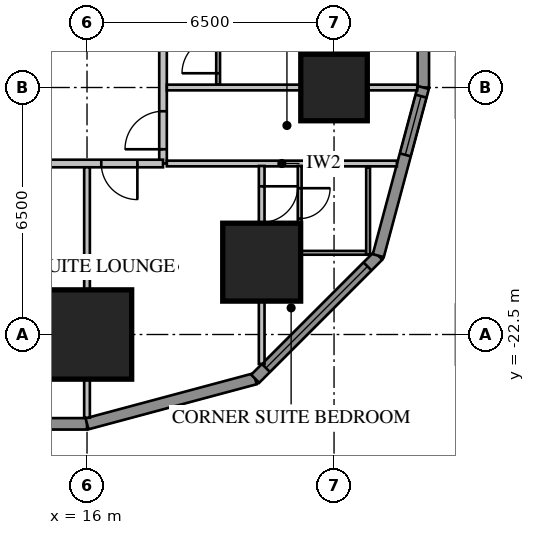
"""IFC4 building model, lengths in metres.
Left out: names, types, materials, properties, quantities, classifications, styles, units other than length and angle.
Written with IfcOpenShell. Run it as: python <this file> out.ifc"""

import sys

from ifc_helpers import new_model, si_unit, direction, frame, frame_2d, origin, origin_2d, place, context, subcontext, project, spatial, rectangle, extrude, element, fill, save


model = new_model("IFC4")
c1 = context("Model", 3, precision=1e-05, world=origin(), true_north=direction((0.0, 1.0)))
c2 = subcontext(c1, "Body", "Model", "MODEL_VIEW")
j1 = project(units=[si_unit("LENGTHUNIT", "METRE"), si_unit("PLANEANGLEUNIT", "RADIAN")], contexts=[c1])
p1 = place(None, origin())
s1 = spatial("IfcSite", under=j1, at=p1, CompositionType="ELEMENT")
p2 = place(p1, origin())
s2 = spatial("IfcBuilding", under=s1, at=p2, CompositionType="ELEMENT")
p3 = place(p2, frame((0.0, 0.0, 46.8)))
s3 = spatial("IfcBuildingStorey", under=s2, at=p3, CompositionType="ELEMENT", Elevation=46.8)
p4 = place(p3, frame((22.5, -16.0, 0.0), z_axis=(0.0, 0.0, 1.0), x_axis=(1.0, 0.0, 0.0)))
e1 = element("IfcColumn", 1, at=p4, inside=s3, PredefinedType="COLUMN", context=c2, shape_type="SweptSolid", body=[
    extrude(rectangle(XDim=1.75, YDim=1.75, at=origin_2d()), origin(), (0.0, 0.0, 1.0), 3.85),
])
p5 = place(p3, frame((16.0, -22.5, 0.0), z_axis=(0.0, 0.0, 1.0), x_axis=(1.0, 0.0, 0.0)))
e2 = element("IfcColumn", 2, at=p5, inside=s3, PredefinedType="COLUMN", context=c2, shape_type="SweptSolid", body=[
    extrude(rectangle(XDim=2.35, YDim=2.35, at=origin_2d()), origin(), (0.0, 0.0, 1.0), 3.85),
])
p6 = place(p3, frame((20.596, -20.596, 0.0), z_axis=(0.0, 0.0, 1.0), x_axis=(1.0, 0.0, 0.0)))
e3 = element("IfcColumn", 3, at=p6, inside=s3, PredefinedType="COLUMN", context=c2, shape_type="SweptSolid", body=[
    extrude(rectangle(XDim=2.05, YDim=2.05, at=origin_2d()), origin(), (0.0, 0.0, 1.0), 3.85),
])
p7 = place(p3, frame((24.85, -16.0, 0.0), z_axis=(0.0, 0.0, 1.0), x_axis=(0.0, 1.0, 0.0)))
e4 = element("IfcWall", 4, at=p7, inside=s3, PredefinedType="SOLIDWALL", context=c2, shape_type="SweptSolid", body=[
    extrude(rectangle(XDim=32.0, YDim=0.3, at=frame_2d((16.0, 0.0))), origin(), (0.0, 0.0, 1.0), 3.65),
])
p8 = place(p7, frame((1.2, 0.0, 0.75)))
e5 = element("IfcOpeningElement", 5, at=p8, cuts=e4, PredefinedType="OPENING", context=c2, shape_type="SweptSolid", body=[
    extrude(rectangle(XDim=1.6, YDim=1.8, at=frame_2d((0.8, 0.9))), frame((0.0, 0.17, 0.0), z_axis=(0.0, -1.0, 0.0), x_axis=(1.0, 0.0, 0.0)), (0.0, 0.0, 1.0), 0.34),
])
p9 = place(p7, frame((5.2, 0.0, 0.75)))
e6 = element("IfcOpeningElement", 6, at=p9, cuts=e4, PredefinedType="OPENING", context=c2, shape_type="SweptSolid", body=[
    extrude(rectangle(XDim=1.6, YDim=1.8, at=frame_2d((0.8, 0.9))), frame((0.0, 0.17, 0.0), z_axis=(0.0, -1.0, 0.0), x_axis=(1.0, 0.0, 0.0)), (0.0, 0.0, 1.0), 0.34),
])
p10 = place(p7, frame((17.2, 0.0, 0.75)))
e7 = element("IfcOpeningElement", 7, at=p10, cuts=e4, PredefinedType="OPENING", context=c2, shape_type="SweptSolid", body=[
    extrude(rectangle(XDim=1.6, YDim=1.8, at=frame_2d((0.8, 0.9))), frame((0.0, 0.17, 0.0), z_axis=(0.0, -1.0, 0.0), x_axis=(1.0, 0.0, 0.0)), (0.0, 0.0, 1.0), 0.34),
])
p11 = place(p7, frame((21.2, 0.0, 0.75)))
e8 = element("IfcOpeningElement", 8, at=p11, cuts=e4, PredefinedType="OPENING", context=c2, shape_type="SweptSolid", body=[
    extrude(rectangle(XDim=1.6, YDim=1.8, at=frame_2d((0.8, 0.9))), frame((0.0, 0.17, 0.0), z_axis=(0.0, -1.0, 0.0), x_axis=(1.0, 0.0, 0.0)), (0.0, 0.0, 1.0), 0.34),
])
p12 = place(p7, frame((25.2, 0.0, 0.75)))
e9 = element("IfcOpeningElement", 9, at=p12, cuts=e4, PredefinedType="OPENING", context=c2, shape_type="SweptSolid", body=[
    extrude(rectangle(XDim=1.6, YDim=1.8, at=frame_2d((0.8, 0.9))), frame((0.0, 0.17, 0.0), z_axis=(0.0, -1.0, 0.0), x_axis=(1.0, 0.0, 0.0)), (0.0, 0.0, 1.0), 0.34),
])
p13 = place(p7, frame((29.2, 0.0, 0.75)))
e10 = element("IfcOpeningElement", 10, at=p13, cuts=e4, PredefinedType="OPENING", context=c2, shape_type="SweptSolid", body=[
    extrude(rectangle(XDim=1.6, YDim=1.8, at=frame_2d((0.8, 0.9))), frame((0.0, 0.17, 0.0), z_axis=(0.0, -1.0, 0.0), x_axis=(1.0, 0.0, 0.0)), (0.0, 0.0, 1.0), 0.34),
])
p14 = place(p7, frame((8.8, 0.0, 0.75)))
e11 = element("IfcOpeningElement", 11, at=p14, cuts=e4, PredefinedType="OPENING", context=c2, shape_type="SweptSolid", body=[
    extrude(rectangle(XDim=2.4, YDim=1.8, at=frame_2d((1.2, 0.9))), frame((0.0, 0.17, 0.0), z_axis=(0.0, -1.0, 0.0), x_axis=(1.0, 0.0, 0.0)), (0.0, 0.0, 1.0), 0.34),
])
p15 = place(p7, frame((13.812, 0.0, 0.0)))
e12 = element("IfcOpeningElement", 12, at=p15, cuts=e4, PredefinedType="OPENING", context=c2, shape_type="SweptSolid", body=[
    extrude(rectangle(XDim=1.0, YDim=2.4, at=frame_2d((0.5, 1.2))), frame((0.0, 0.17, 0.0), z_axis=(0.0, -1.0, 0.0), x_axis=(1.0, 0.0, 0.0)), (0.0, 0.0, 1.0), 0.34),
])
p16 = place(p3, frame((-16.0, -24.85, 0.0), z_axis=(0.0, 0.0, 1.0), x_axis=(1.0, 0.0, 0.0)))
e13 = element("IfcWall", 13, at=p16, inside=s3, PredefinedType="SOLIDWALL", context=c2, shape_type="SweptSolid", body=[
    extrude(rectangle(XDim=32.0, YDim=0.3, at=frame_2d((16.0, 0.0))), origin(), (0.0, 0.0, 1.0), 3.65),
])
p17 = place(p16, frame((1.2, 0.0, 0.75)))
e14 = element("IfcOpeningElement", 14, at=p17, cuts=e13, PredefinedType="OPENING", context=c2, shape_type="SweptSolid", body=[
    extrude(rectangle(XDim=1.6, YDim=1.8, at=frame_2d((0.8, 0.9))), frame((0.0, 0.17, 0.0), z_axis=(0.0, -1.0, 0.0), x_axis=(1.0, 0.0, 0.0)), (0.0, 0.0, 1.0), 0.34),
])
p18 = place(p16, frame((5.2, 0.0, 0.75)))
e15 = element("IfcOpeningElement", 15, at=p18, cuts=e13, PredefinedType="OPENING", context=c2, shape_type="SweptSolid", body=[
    extrude(rectangle(XDim=1.6, YDim=1.8, at=frame_2d((0.8, 0.9))), frame((0.0, 0.17, 0.0), z_axis=(0.0, -1.0, 0.0), x_axis=(1.0, 0.0, 0.0)), (0.0, 0.0, 1.0), 0.34),
])
p19 = place(p16, frame((17.2, 0.0, 0.75)))
e16 = element("IfcOpeningElement", 16, at=p19, cuts=e13, PredefinedType="OPENING", context=c2, shape_type="SweptSolid", body=[
    extrude(rectangle(XDim=1.6, YDim=1.8, at=frame_2d((0.8, 0.9))), frame((0.0, 0.17, 0.0), z_axis=(0.0, -1.0, 0.0), x_axis=(1.0, 0.0, 0.0)), (0.0, 0.0, 1.0), 0.34),
])
p20 = place(p16, frame((21.2, 0.0, 0.75)))
e17 = element("IfcOpeningElement", 17, at=p20, cuts=e13, PredefinedType="OPENING", context=c2, shape_type="SweptSolid", body=[
    extrude(rectangle(XDim=1.6, YDim=1.8, at=frame_2d((0.8, 0.9))), frame((0.0, 0.17, 0.0), z_axis=(0.0, -1.0, 0.0), x_axis=(1.0, 0.0, 0.0)), (0.0, 0.0, 1.0), 0.34),
])
p21 = place(p16, frame((25.2, 0.0, 0.75)))
e18 = element("IfcOpeningElement", 18, at=p21, cuts=e13, PredefinedType="OPENING", context=c2, shape_type="SweptSolid", body=[
    extrude(rectangle(XDim=1.6, YDim=1.8, at=frame_2d((0.8, 0.9))), frame((0.0, 0.17, 0.0), z_axis=(0.0, -1.0, 0.0), x_axis=(1.0, 0.0, 0.0)), (0.0, 0.0, 1.0), 0.34),
])
p22 = place(p16, frame((29.2, 0.0, 0.75)))
e19 = element("IfcOpeningElement", 19, at=p22, cuts=e13, PredefinedType="OPENING", context=c2, shape_type="SweptSolid", body=[
    extrude(rectangle(XDim=1.6, YDim=1.8, at=frame_2d((0.8, 0.9))), frame((0.0, 0.17, 0.0), z_axis=(0.0, -1.0, 0.0), x_axis=(1.0, 0.0, 0.0)), (0.0, 0.0, 1.0), 0.34),
])
p23 = place(p16, frame((8.8, 0.0, 0.75)))
e20 = element("IfcOpeningElement", 20, at=p23, cuts=e13, PredefinedType="OPENING", context=c2, shape_type="SweptSolid", body=[
    extrude(rectangle(XDim=2.4, YDim=1.8, at=frame_2d((1.2, 0.9))), frame((0.0, 0.17, 0.0), z_axis=(0.0, -1.0, 0.0), x_axis=(1.0, 0.0, 0.0)), (0.0, 0.0, 1.0), 0.34),
])
p24 = place(p16, frame((13.812, 0.0, 0.0)))
e21 = element("IfcOpeningElement", 21, at=p24, cuts=e13, PredefinedType="OPENING", context=c2, shape_type="SweptSolid", body=[
    extrude(rectangle(XDim=1.0, YDim=2.4, at=frame_2d((0.5, 1.2))), frame((0.0, 0.17, 0.0), z_axis=(0.0, -1.0, 0.0), x_axis=(1.0, 0.0, 0.0)), (0.0, 0.0, 1.0), 0.34),
])
p25 = place(p3, frame((16.0, -24.85, 0.0), z_axis=(0.0, 0.0, 1.0), x_axis=(0.965920218567, 0.258839972501, 0.0)))
e22 = element("IfcWall", 22, at=p25, inside=s3, PredefinedType="SOLIDWALL", context=c2, shape_type="SweptSolid", body=[
    extrude(rectangle(XDim=4.581, YDim=0.3, at=frame_2d((2.291, 0.0))), origin(), (0.0, 0.0, 1.0), 3.65),
])
p26 = place(p3, frame((20.425, -23.664, 0.0), z_axis=(0.0, 0.0, 1.0), x_axis=(0.707106781187, 0.707106781187, 0.0)))
e23 = element("IfcWall", 23, at=p26, inside=s3, PredefinedType="SOLIDWALL", context=c2, shape_type="SweptSolid", body=[
    extrude(rectangle(XDim=4.581, YDim=0.3, at=frame_2d((2.291, 0.0))), origin(), (0.0, 0.0, 1.0), 3.65),
])
p27 = place(p26, frame((0.4, 0.0, 0.75)))
e24 = element("IfcOpeningElement", 24, at=p27, cuts=e23, PredefinedType="OPENING", context=c2, shape_type="SweptSolid", body=[
    extrude(rectangle(XDim=3.781, YDim=1.8, at=frame_2d((1.891, 0.9))), frame((0.0, 0.17, 0.0), z_axis=(0.0, -1.0, 0.0), x_axis=(1.0, 0.0, 0.0)), (0.0, 0.0, 1.0), 0.34),
])
p28 = place(p3, frame((23.664, -20.425, 0.0), z_axis=(0.0, 0.0, 1.0), x_axis=(0.258839972501, 0.965920218567, 0.0)))
e25 = element("IfcWall", 25, at=p28, inside=s3, PredefinedType="SOLIDWALL", context=c2, shape_type="SweptSolid", body=[
    extrude(rectangle(XDim=4.581, YDim=0.3, at=frame_2d((2.291, 0.0))), origin(), (0.0, 0.0, 1.0), 3.65),
])
p29 = place(p28, frame((2.746, 0.0, 0.75)))
e26 = element("IfcOpeningElement", 26, at=p29, cuts=e25, PredefinedType="OPENING", context=c2, shape_type="SweptSolid", body=[
    extrude(rectangle(XDim=1.6, YDim=1.8, at=frame_2d((0.8, 0.9))), frame((0.0, 0.17, 0.0), z_axis=(0.0, -1.0, 0.0), x_axis=(1.0, 0.0, 0.0)), (0.0, 0.0, 1.0), 0.34),
])
p30 = place(p3, frame((18.0, -18.0, 0.0), z_axis=(0.0, 0.0, 1.0), x_axis=(0.0, 1.0, 0.0)))
e27 = element("IfcWall", 27, at=p30, inside=s3, PredefinedType="PARTITIONING", context=c2, shape_type="SweptSolid", body=[
    extrude(rectangle(XDim=36.0, YDim=0.2, at=frame_2d((18.0, 0.0))), origin(), (0.0, 0.0, 1.0), 3.65),
])
p31 = place(p30, frame((10.4, 0.0, 0.0)))
e28 = element("IfcOpeningElement", 28, at=p31, cuts=e27, PredefinedType="OPENING", context=c2, shape_type="SweptSolid", body=[
    extrude(rectangle(XDim=1.0, YDim=2.1, at=frame_2d((0.5, 1.05))), frame((0.0, 0.12, 0.0), z_axis=(0.0, -1.0, 0.0), x_axis=(1.0, 0.0, 0.0)), (0.0, 0.0, 1.0), 0.24),
])
p32 = place(p30, frame((14.4, 0.0, 0.0)))
e29 = element("IfcOpeningElement", 29, at=p32, cuts=e27, PredefinedType="OPENING", context=c2, shape_type="SweptSolid", body=[
    extrude(rectangle(XDim=1.0, YDim=2.1, at=frame_2d((0.5, 1.05))), frame((0.0, 0.12, 0.0), z_axis=(0.0, -1.0, 0.0), x_axis=(1.0, 0.0, 0.0)), (0.0, 0.0, 1.0), 0.24),
])
p33 = place(p30, frame((0.375, 0.0, 0.0)))
e30 = element("IfcOpeningElement", 30, at=p33, cuts=e27, PredefinedType="OPENING", context=c2, shape_type="SweptSolid", body=[
    extrude(rectangle(XDim=1.0, YDim=2.1, at=frame_2d((0.5, 1.05))), frame((0.0, 0.12, 0.0), z_axis=(0.0, -1.0, 0.0), x_axis=(1.0, 0.0, 0.0)), (0.0, 0.0, 1.0), 0.24),
])
p34 = place(p30, frame((34.375, 0.0, 0.0)))
e31 = element("IfcOpeningElement", 31, at=p34, cuts=e27, PredefinedType="OPENING", context=c2, shape_type="SweptSolid", body=[
    extrude(rectangle(XDim=0.95, YDim=2.1, at=frame_2d((0.475, 1.05))), frame((0.0, 0.12, 0.0), z_axis=(0.0, -1.0, 0.0), x_axis=(1.0, 0.0, 0.0)), (0.0, 0.0, 1.0), 0.24),
])
p35 = place(p3, frame((19.45, -15.925, 0.0), z_axis=(0.0, 0.0, 1.0), x_axis=(0.0, 1.0, 0.0)))
e32 = element("IfcWall", 32, at=p35, inside=s3, PredefinedType="PARTITIONING", context=c2, shape_type="SweptSolid", body=[
    extrude(rectangle(XDim=11.85, YDim=0.1, at=frame_2d((5.925, 0.0))), origin(), (0.0, 0.0, 1.0), 3.65),
])
p36 = place(p35, frame((10.125, 0.0, 0.0)))
e33 = element("IfcOpeningElement", 33, at=p36, cuts=e32, PredefinedType="OPENING", context=c2, shape_type="SweptSolid", body=[
    extrude(rectangle(XDim=1.0, YDim=2.1, at=frame_2d((0.5, 1.05))), frame((0.0, 0.07, 0.0), z_axis=(0.0, -1.0, 0.0), x_axis=(1.0, 0.0, 0.0)), (0.0, 0.0, 1.0), 0.14),
])
p37 = place(p35, frame((8.3, 0.0, 0.0)))
e34 = element("IfcOpeningElement", 34, at=p37, cuts=e32, PredefinedType="OPENING", context=c2, shape_type="SweptSolid", body=[
    extrude(rectangle(XDim=0.8, YDim=2.1, at=frame_2d((0.4, 1.05))), frame((0.0, 0.07, 0.0), z_axis=(0.0, -1.0, 0.0), x_axis=(1.0, 0.0, 0.0)), (0.0, 0.0, 1.0), 0.14),
])
p38 = place(p35, frame((0.3, 0.0, 0.0)))
e35 = element("IfcOpeningElement", 35, at=p38, cuts=e32, PredefinedType="OPENING", context=c2, shape_type="SweptSolid", body=[
    extrude(rectangle(XDim=0.95, YDim=2.1, at=frame_2d((0.475, 1.05))), frame((0.0, 0.07, 0.0), z_axis=(0.0, -1.0, 0.0), x_axis=(1.0, 0.0, 0.0)), (0.0, 0.0, 1.0), 0.14),
])
p39 = place(p35, frame((4.3, 0.0, 0.0)))
e36 = element("IfcOpeningElement", 36, at=p39, cuts=e32, PredefinedType="OPENING", context=c2, shape_type="SweptSolid", body=[
    extrude(rectangle(XDim=0.95, YDim=2.1, at=frame_2d((0.475, 1.05))), frame((0.0, 0.07, 0.0), z_axis=(0.0, -1.0, 0.0), x_axis=(1.0, 0.0, 0.0)), (0.0, 0.0, 1.0), 0.14),
])
p40 = place(p3, frame((18.1, -18.0, 0.0), z_axis=(0.0, 0.0, 1.0), x_axis=(1.0, 0.0, 0.0)))
e37 = element("IfcWall", 37, at=p40, inside=s3, PredefinedType="PARTITIONING", context=c2, shape_type="SweptSolid", body=[
    extrude(rectangle(XDim=6.053, YDim=0.15, at=frame_2d((3.027, 0.0))), origin(), (0.0, 0.0, 1.0), 3.65),
])
p41 = place(p3, frame((18.1, -16.0, 0.0), z_axis=(0.0, 0.0, 1.0), x_axis=(1.0, 0.0, 0.0)))
e38 = element("IfcWall", 38, at=p41, inside=s3, PredefinedType="PARTITIONING", context=c2, shape_type="SweptSolid", body=[
    extrude(rectangle(XDim=6.589, YDim=0.15, at=frame_2d((3.295, 0.0))), origin(), (0.0, 0.0, 1.0), 3.65),
])
p42 = place(p3, frame((-18.0, -18.0, 0.0), z_axis=(0.0, 0.0, 1.0), x_axis=(1.0, 0.0, 0.0)))
e39 = element("IfcWall", 39, at=p42, inside=s3, PredefinedType="PARTITIONING", context=c2, shape_type="SweptSolid", body=[
    extrude(rectangle(XDim=36.0, YDim=0.2, at=frame_2d((18.0, 0.0))), origin(), (0.0, 0.0, 1.0), 3.65),
])
p43 = place(p42, frame((0.375, 0.0, 0.0)))
e40 = element("IfcOpeningElement", 40, at=p43, cuts=e39, PredefinedType="OPENING", context=c2, shape_type="SweptSolid", body=[
    extrude(rectangle(XDim=1.0, YDim=2.1, at=frame_2d((0.5, 1.05))), frame((0.0, 0.12, 0.0), z_axis=(0.0, -1.0, 0.0), x_axis=(1.0, 0.0, 0.0)), (0.0, 0.0, 1.0), 0.24),
])
p44 = place(p42, frame((2.45, 0.0, 0.0)))
e41 = element("IfcOpeningElement", 41, at=p44, cuts=e39, PredefinedType="OPENING", context=c2, shape_type="SweptSolid", body=[
    extrude(rectangle(XDim=0.8, YDim=2.1, at=frame_2d((0.4, 1.05))), frame((0.0, 0.12, 0.0), z_axis=(0.0, -1.0, 0.0), x_axis=(1.0, 0.0, 0.0)), (0.0, 0.0, 1.0), 0.24),
])
p45 = place(p42, frame((4.05, 0.0, 0.0)))
e42 = element("IfcOpeningElement", 42, at=p45, cuts=e39, PredefinedType="OPENING", context=c2, shape_type="SweptSolid", body=[
    extrude(rectangle(XDim=1.0, YDim=2.1, at=frame_2d((0.5, 1.05))), frame((0.0, 0.12, 0.0), z_axis=(0.0, -1.0, 0.0), x_axis=(1.0, 0.0, 0.0)), (0.0, 0.0, 1.0), 0.24),
])
p46 = place(p42, frame((6.45, 0.0, 0.0)))
e43 = element("IfcOpeningElement", 43, at=p46, cuts=e39, PredefinedType="OPENING", context=c2, shape_type="SweptSolid", body=[
    extrude(rectangle(XDim=0.9, YDim=2.1, at=frame_2d((0.45, 1.05))), frame((0.0, 0.12, 0.0), z_axis=(0.0, -1.0, 0.0), x_axis=(1.0, 0.0, 0.0)), (0.0, 0.0, 1.0), 0.24),
])
p47 = place(p42, frame((8.15, 0.0, 0.0)))
e44 = element("IfcOpeningElement", 44, at=p47, cuts=e39, PredefinedType="OPENING", context=c2, shape_type="SweptSolid", body=[
    extrude(rectangle(XDim=1.0, YDim=2.1, at=frame_2d((0.5, 1.05))), frame((0.0, 0.12, 0.0), z_axis=(0.0, -1.0, 0.0), x_axis=(1.0, 0.0, 0.0)), (0.0, 0.0, 1.0), 0.24),
])
p48 = place(p42, frame((19.95, 0.0, 0.0)))
e45 = element("IfcOpeningElement", 45, at=p48, cuts=e39, PredefinedType="OPENING", context=c2, shape_type="SweptSolid", body=[
    extrude(rectangle(XDim=0.95, YDim=2.1, at=frame_2d((0.475, 1.05))), frame((0.0, 0.12, 0.0), z_axis=(0.0, -1.0, 0.0), x_axis=(1.0, 0.0, 0.0)), (0.0, 0.0, 1.0), 0.24),
])
p49 = place(p42, frame((23.95, 0.0, 0.0)))
e46 = element("IfcOpeningElement", 46, at=p49, cuts=e39, PredefinedType="OPENING", context=c2, shape_type="SweptSolid", body=[
    extrude(rectangle(XDim=0.95, YDim=2.1, at=frame_2d((0.475, 1.05))), frame((0.0, 0.12, 0.0), z_axis=(0.0, -1.0, 0.0), x_axis=(1.0, 0.0, 0.0)), (0.0, 0.0, 1.0), 0.24),
])
p50 = place(p42, frame((27.95, 0.0, 0.0)))
e47 = element("IfcOpeningElement", 47, at=p50, cuts=e39, PredefinedType="OPENING", context=c2, shape_type="SweptSolid", body=[
    extrude(rectangle(XDim=0.95, YDim=2.1, at=frame_2d((0.475, 1.05))), frame((0.0, 0.12, 0.0), z_axis=(0.0, -1.0, 0.0), x_axis=(1.0, 0.0, 0.0)), (0.0, 0.0, 1.0), 0.24),
])
p51 = place(p42, frame((31.95, 0.0, 0.0)))
e48 = element("IfcOpeningElement", 48, at=p51, cuts=e39, PredefinedType="OPENING", context=c2, shape_type="SweptSolid", body=[
    extrude(rectangle(XDim=0.95, YDim=2.1, at=frame_2d((0.475, 1.05))), frame((0.0, 0.12, 0.0), z_axis=(0.0, -1.0, 0.0), x_axis=(1.0, 0.0, 0.0)), (0.0, 0.0, 1.0), 0.24),
])
p52 = place(p42, frame((34.375, 0.0, 0.0)))
e49 = element("IfcOpeningElement", 49, at=p52, cuts=e39, PredefinedType="OPENING", context=c2, shape_type="SweptSolid", body=[
    extrude(rectangle(XDim=0.95, YDim=2.1, at=frame_2d((0.475, 1.05))), frame((0.0, 0.12, 0.0), z_axis=(0.0, -1.0, 0.0), x_axis=(1.0, 0.0, 0.0)), (0.0, 0.0, 1.0), 0.24),
])
p53 = place(p42, frame((11.2, 0.0, 0.0)))
e50 = element("IfcOpeningElement", 50, at=p53, cuts=e39, PredefinedType="OPENING", context=c2, shape_type="SweptSolid", body=[
    extrude(rectangle(XDim=1.0, YDim=2.1, at=frame_2d((0.5, 1.05))), frame((0.0, 0.12, 0.0), z_axis=(0.0, -1.0, 0.0), x_axis=(1.0, 0.0, 0.0)), (0.0, 0.0, 1.0), 0.24),
])
p54 = place(p3, frame((16.0, -18.1, 0.0), z_axis=(0.0, 0.0, 1.0), x_axis=(0.0, -1.0, 0.0)))
e51 = element("IfcWall", 51, at=p54, inside=s3, PredefinedType="PARTITIONING", context=c2, shape_type="SweptSolid", body=[
    extrude(rectangle(XDim=6.589, YDim=0.15, at=frame_2d((3.295, 0.0))), origin(), (0.0, 0.0, 1.0), 3.65),
])
p55 = place(p3, frame((21.596, -18.065, 0.0), z_axis=(0.0, 0.0, 1.0), x_axis=(0.0, -1.0, 0.0)))
e52 = element("IfcWall", 52, at=p55, inside=s3, PredefinedType="PARTITIONING", context=c2, shape_type="SweptSolid", body=[
    extrude(rectangle(XDim=2.335, YDim=0.1, at=frame_2d((1.167, 0.0))), origin(), (0.0, 0.0, 1.0), 3.65),
])
p56 = place(p55, frame((0.585, 0.0, 0.0)))
e53 = element("IfcOpeningElement", 53, at=p56, cuts=e52, PredefinedType="OPENING", context=c2, shape_type="SweptSolid", body=[
    extrude(rectangle(XDim=0.8, YDim=2.1, at=frame_2d((0.4, 1.05))), frame((0.0, 0.07, 0.0), z_axis=(0.0, -1.0, 0.0), x_axis=(1.0, 0.0, 0.0)), (0.0, 0.0, 1.0), 0.14),
])
p57 = place(p3, frame((21.646, -20.35, 0.0), z_axis=(0.0, 0.0, 1.0), x_axis=(1.0, 0.0, 0.0)))
e54 = element("IfcWall", 54, at=p57, inside=s3, PredefinedType="PARTITIONING", context=c2, shape_type="SweptSolid", body=[
    extrude(rectangle(XDim=1.7, YDim=0.1, at=frame_2d((0.85, 0.0))), origin(), (0.0, 0.0, 1.0), 3.65),
])
p58 = place(p3, frame((23.396, -18.1, 0.0), z_axis=(0.0, 0.0, 1.0), x_axis=(0.0, -1.0, 0.0)))
e55 = element("IfcWall", 55, at=p58, inside=s3, PredefinedType="PARTITIONING", context=c2, shape_type="SweptSolid", body=[
    extrude(rectangle(XDim=2.3, YDim=0.1, at=frame_2d((1.15, 0.0))), origin(), (0.0, 0.0, 1.0), 3.65),
])
p59 = place(p3, frame((20.596, -18.065, 0.0), z_axis=(0.0, 0.0, 1.0), x_axis=(0.0, -1.0, 0.0)))
e56 = element("IfcWall", 56, at=p59, inside=s3, PredefinedType="PARTITIONING", context=c2, shape_type="SweptSolid", body=[
    extrude(rectangle(XDim=5.209, YDim=0.15, at=frame_2d((2.604, 0.0))), origin(), (0.0, 0.0, 1.0), 3.65),
])
p60 = place(p59, frame((0.535, 0.0, 0.0)))
e57 = element("IfcOpeningElement", 57, at=p60, cuts=e56, PredefinedType="OPENING", context=c2, shape_type="SweptSolid", body=[
    extrude(rectangle(XDim=0.95, YDim=2.1, at=frame_2d((0.475, 1.05))), frame((0.0, 0.095, 0.0), z_axis=(0.0, -1.0, 0.0), x_axis=(1.0, 0.0, 0.0)), (0.0, 0.0, 1.0), 0.19),
])
p61 = place(p29, origin())
e58 = element("IfcWindow", 58, at=p61, inside=s3, PartitioningType="SINGLE_PANEL", PredefinedType="WINDOW", context=c2, shape_type="SweptSolid", body=[
    extrude(rectangle(XDim=1.6, YDim=1.8, at=frame_2d((0.8, 0.9))), frame((0.0, 0.03, 0.0), z_axis=(0.0, -1.0, 0.0), x_axis=(1.0, 0.0, 0.0)), (0.0, 0.0, 1.0), 0.06),
])
fill(e26, e58)
p62 = place(p27, origin())
e59 = element("IfcWindow", 59, at=p62, inside=s3, PartitioningType="SINGLE_PANEL", PredefinedType="WINDOW", context=c2, shape_type="SweptSolid", body=[
    extrude(rectangle(XDim=3.781, YDim=1.8, at=frame_2d((1.891, 0.9))), frame((0.0, 0.03, 0.0), z_axis=(0.0, -1.0, 0.0), x_axis=(1.0, 0.0, 0.0)), (0.0, 0.0, 1.0), 0.06),
])
fill(e24, e59)
p63 = place(p33, origin())
e60 = element("IfcDoor", 60, at=p63, inside=s3, OperationType="SINGLE_SWING_LEFT", PredefinedType="DOOR", context=c2, shape_type="SweptSolid", body=[
    extrude(rectangle(XDim=1.0, YDim=2.1, at=frame_2d((0.5, 1.05))), frame((0.0, 0.025, 0.0), z_axis=(0.0, -1.0, 0.0), x_axis=(1.0, 0.0, 0.0)), (0.0, 0.0, 1.0), 0.05),
])
fill(e30, e60)
p64 = place(p38, origin())
e61 = element("IfcDoor", 61, at=p64, inside=s3, OperationType="SINGLE_SWING_LEFT", PredefinedType="DOOR", context=c2, shape_type="SweptSolid", body=[
    extrude(rectangle(XDim=0.95, YDim=2.1, at=frame_2d((0.475, 1.05))), frame((0.0, 0.025, 0.0), z_axis=(0.0, -1.0, 0.0), x_axis=(1.0, 0.0, 0.0)), (0.0, 0.0, 1.0), 0.05),
])
fill(e35, e61)
p65 = place(p52, origin())
e62 = element("IfcDoor", 62, at=p65, inside=s3, OperationType="SINGLE_SWING_RIGHT", PredefinedType="DOOR", context=c2, shape_type="SweptSolid", body=[
    extrude(rectangle(XDim=0.95, YDim=2.1, at=frame_2d((0.475, 1.05))), frame((0.0, 0.025, 0.0), z_axis=(0.0, -1.0, 0.0), x_axis=(1.0, 0.0, 0.0)), (0.0, 0.0, 1.0), 0.05),
])
fill(e49, e62)
p66 = place(p56, origin())
e63 = element("IfcDoor", 63, at=p66, inside=s3, OperationType="SINGLE_SWING_LEFT", PredefinedType="DOOR", context=c2, shape_type="SweptSolid", body=[
    extrude(rectangle(XDim=0.8, YDim=2.1, at=frame_2d((0.4, 1.05))), frame((0.0, 0.025, 0.0), z_axis=(0.0, -1.0, 0.0), x_axis=(1.0, 0.0, 0.0)), (0.0, 0.0, 1.0), 0.05),
])
fill(e53, e63)
p67 = place(p60, origin())
e64 = element("IfcDoor", 64, at=p67, inside=s3, OperationType="SINGLE_SWING_LEFT", PredefinedType="DOOR", context=c2, shape_type="SweptSolid", body=[
    extrude(rectangle(XDim=0.95, YDim=2.1, at=frame_2d((0.475, 1.05))), frame((0.0, 0.025, 0.0), z_axis=(0.0, -1.0, 0.0), x_axis=(1.0, 0.0, 0.0)), (0.0, 0.0, 1.0), 0.05),
])
fill(e57, e64)
save(model, sys.argv[1])
